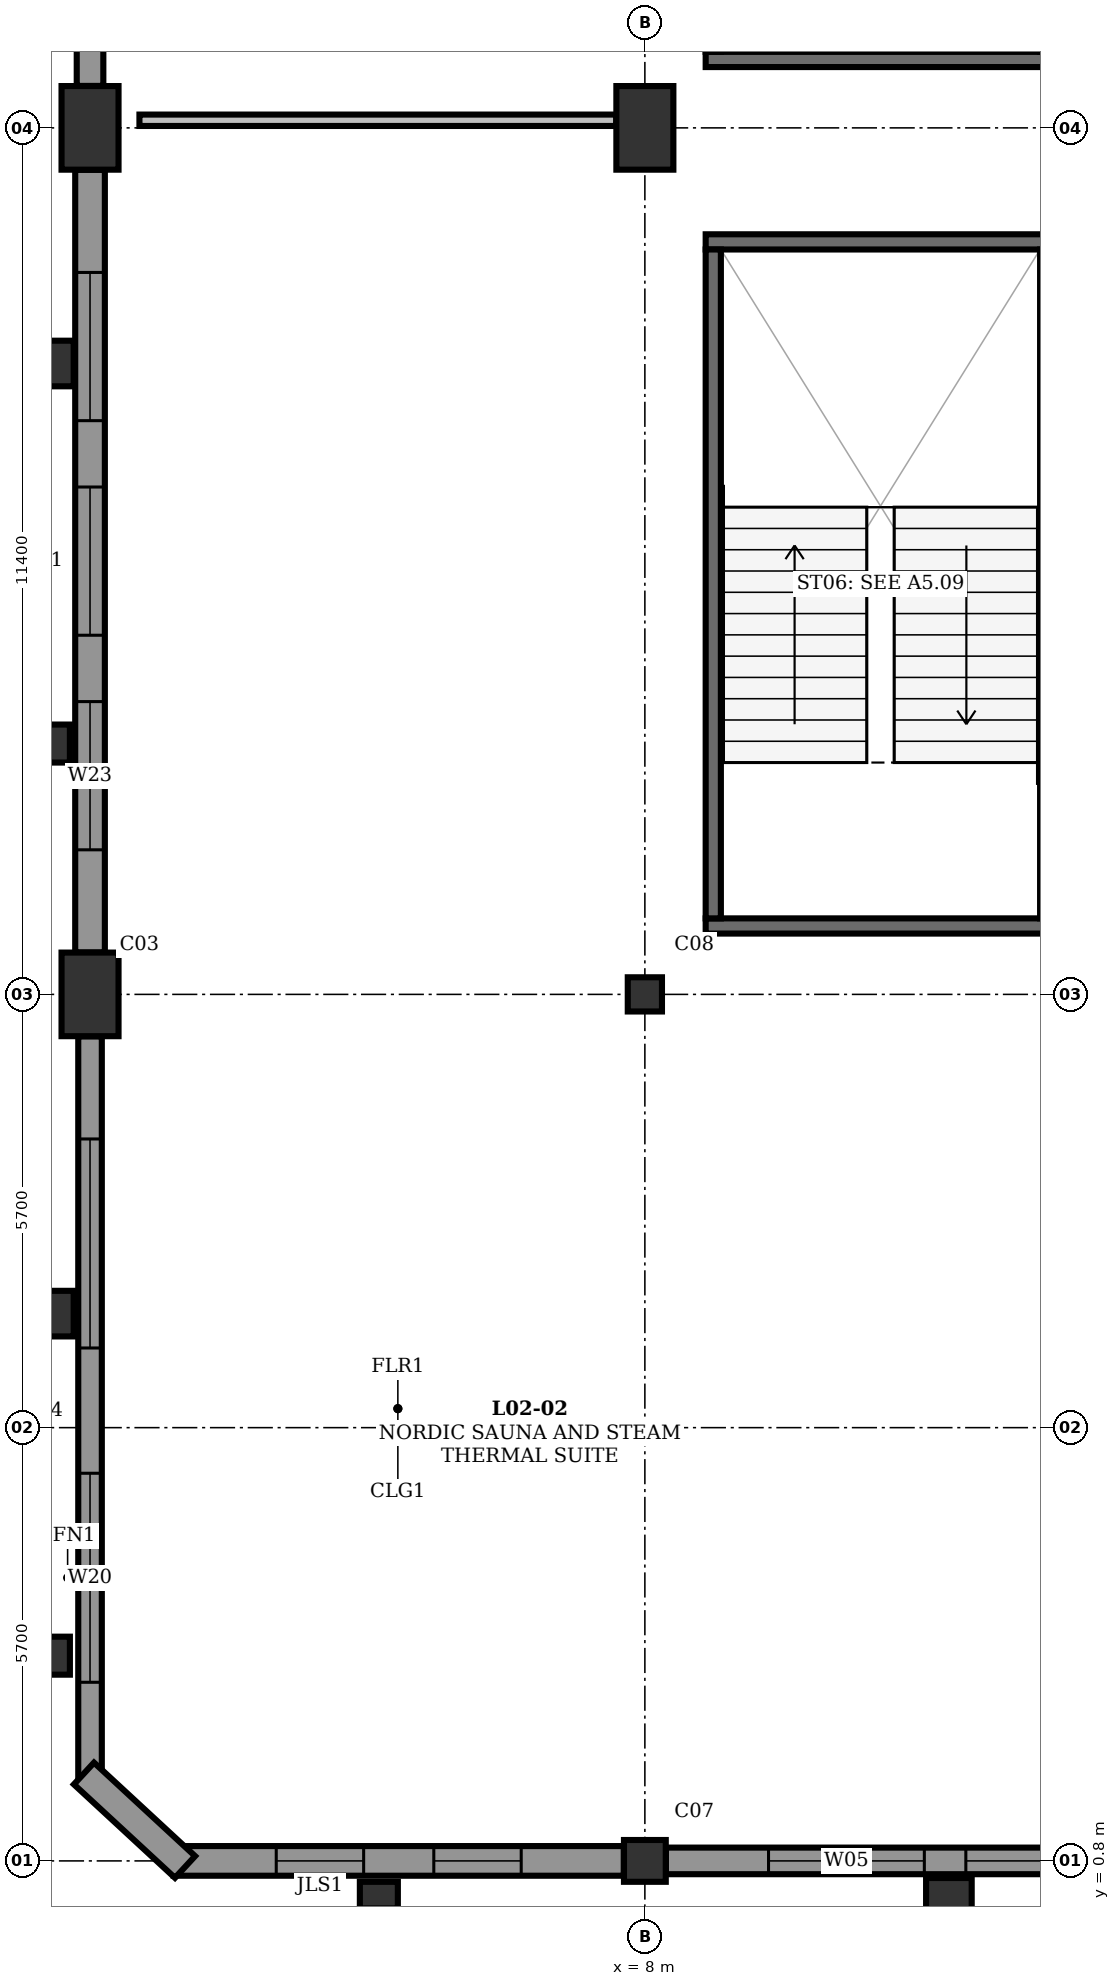
"""IFC4 building model, lengths in metres.
Left out: names, types, materials, properties, quantities, classifications, styles, units other than length and angle.
Written with IfcOpenShell. Run it as: python <this file> out.ifc"""

import sys

from ifc_helpers import new_model, si_unit, direction, frame, frame_2d, origin, origin_2d, place, context, subcontext, project, spatial, rectangle, extrude, element, fill, save


model = new_model("IFC4")
c1 = context("Model", 3, precision=1e-05, world=origin(), true_north=direction((0.0, 1.0)))
c2 = subcontext(c1, "Body", "Model", "MODEL_VIEW")
j1 = project(units=[si_unit("LENGTHUNIT", "METRE"), si_unit("PLANEANGLEUNIT", "RADIAN")], contexts=[c1])
p1 = place(None, origin())
s1 = spatial("IfcSite", under=j1, at=p1, CompositionType="ELEMENT")
p2 = place(p1, origin())
s2 = spatial("IfcBuilding", under=s1, at=p2, CompositionType="ELEMENT")
p3 = place(p2, frame((0.0, 0.0, 10.2)))
s3 = spatial("IfcBuildingStorey", under=s2, at=p3, CompositionType="ELEMENT", Elevation=10.2)
for number, where, z_axis, x_axis in (
    (1, (0.7, 12.2, 0.0), (0.0, 0.0, 1.0), (1.0, 0.0, 0.0)),
    (2, (0.7, 23.6, 0.0), (0.0, 0.0, 1.0), (1.0, 0.0, 0.0)),
):
    element("IfcColumn", number, at=place(p3, frame(where, z_axis=z_axis, x_axis=x_axis)), inside=s3, PredefinedType="COLUMN", context=c2, shape_type="SweptSolid", body=[
        extrude(rectangle(XDim=0.75, YDim=1.1, at=origin_2d()), origin(), (0.0, 0.0, 1.0), 4.5),
    ])
p4 = place(p3, frame((8.0, 0.8, 0.0), z_axis=(0.0, 0.0, 1.0), x_axis=(1.0, 0.0, 0.0)))
e3 = element("IfcColumn", 3, at=p4, inside=s3, PredefinedType="COLUMN", context=c2, shape_type="SweptSolid", body=[
    extrude(rectangle(XDim=0.55, YDim=0.55, at=origin_2d()), origin(), (0.0, 0.0, 1.0), 4.5),
])
p5 = place(p3, frame((8.0, 12.2, 0.0), z_axis=(0.0, 0.0, 1.0), x_axis=(1.0, 0.0, 0.0)))
e4 = element("IfcColumn", 4, at=p5, inside=s3, PredefinedType="COLUMN", context=c2, shape_type="SweptSolid", body=[
    extrude(rectangle(XDim=0.45, YDim=0.45, at=origin_2d()), origin(), (0.0, 0.0, 1.0), 4.5),
])
p6 = place(p3, frame((8.0, 23.6, 0.0), z_axis=(0.0, 0.0, 1.0), x_axis=(1.0, 0.0, 0.0)))
e5 = element("IfcColumn", 5, at=p6, inside=s3, PredefinedType="COLUMN", context=c2, shape_type="SweptSolid", body=[
    extrude(rectangle(XDim=0.75, YDim=1.1, at=origin_2d()), origin(), (0.0, 0.0, 1.0), 4.5),
])
p7 = place(p3, frame((0.26, 3.5, 0.0), z_axis=(0.0, 0.0, 1.0), x_axis=(1.0, 0.0, 0.0)))
e6 = element("IfcColumn", 6, at=p7, inside=s3, PredefinedType="PILASTER", context=c2, shape_type="SweptSolid", body=[
    extrude(rectangle(XDim=0.35, YDim=0.5, at=origin_2d()), origin(), (0.0, 0.0, 1.0), 4.5),
])
p8 = place(p3, frame((0.26, 8.0, 0.0), z_axis=(0.0, 0.0, 1.0), x_axis=(1.0, 0.0, 0.0)))
e7 = element("IfcColumn", 7, at=p8, inside=s3, PredefinedType="PILASTER", context=c2, shape_type="SweptSolid", body=[
    extrude(rectangle(XDim=0.45, YDim=0.6, at=origin_2d()), origin(), (0.0, 0.0, 1.0), 4.5),
])
p9 = place(p3, frame((0.26, 15.5, 0.0), z_axis=(0.0, 0.0, 1.0), x_axis=(1.0, 0.0, 0.0)))
e8 = element("IfcColumn", 8, at=p9, inside=s3, PredefinedType="PILASTER", context=c2, shape_type="SweptSolid", body=[
    extrude(rectangle(XDim=0.35, YDim=0.5, at=origin_2d()), origin(), (0.0, 0.0, 1.0), 4.5),
])
p10 = place(p3, frame((0.26, 20.5, 0.0), z_axis=(0.0, 0.0, 1.0), x_axis=(1.0, 0.0, 0.0)))
e9 = element("IfcColumn", 9, at=p10, inside=s3, PredefinedType="PILASTER", context=c2, shape_type="SweptSolid", body=[
    extrude(rectangle(XDim=0.45, YDim=0.6, at=origin_2d()), origin(), (0.0, 0.0, 1.0), 4.5),
])
p11 = place(p3, frame((4.5, 0.35, 0.0), z_axis=(0.0, 0.0, 1.0), x_axis=(0.0, 1.0, 0.0)))
e10 = element("IfcColumn", 10, at=p11, inside=s3, PredefinedType="PILASTER", context=c2, shape_type="SweptSolid", body=[
    extrude(rectangle(XDim=0.35, YDim=0.5, at=origin_2d()), origin(), (0.0, 0.0, 1.0), 4.5),
])
p12 = place(p3, frame((12.0, 0.35, 0.0), z_axis=(0.0, 0.0, 1.0), x_axis=(0.0, 1.0, 0.0)))
e11 = element("IfcColumn", 11, at=p12, inside=s3, PredefinedType="PILASTER", context=c2, shape_type="SweptSolid", body=[
    extrude(rectangle(XDim=0.45, YDim=0.6, at=origin_2d()), origin(), (0.0, 0.0, 1.0), 4.5),
])
p13 = place(p3, frame((0.7, 1.8, 0.0), z_axis=(0.0, 0.0, 1.0), x_axis=(0.0, 1.0, 0.0)))
e12 = element("IfcWall", 12, at=p13, inside=s3, PredefinedType="STANDARD", context=c2, shape_type="SweptSolid", body=[
    extrude(rectangle(XDim=9.848, YDim=0.31, at=frame_2d((4.924, 0.0))), origin(), (0.0, 0.0, 1.0), 4.2),
])
p14 = place(p13, frame((1.35, 0.0, 0.75)))
e13 = element("IfcOpeningElement", 13, at=p14, cuts=e12, PredefinedType="OPENING", context=c2, shape_type="SweptSolid", body=[
    extrude(rectangle(XDim=2.75, YDim=2.35, at=frame_2d((1.375, 1.175))), frame((0.0, 0.167, 0.0), z_axis=(0.0, -1.0, 0.0), x_axis=(1.0, 0.0, 0.0)), (0.0, 0.0, 1.0), 0.334),
])
p15 = place(p13, frame((5.748, 0.0, 0.75)))
e14 = element("IfcOpeningElement", 14, at=p15, cuts=e12, PredefinedType="OPENING", context=c2, shape_type="SweptSolid", body=[
    extrude(rectangle(XDim=2.75, YDim=2.35, at=frame_2d((1.375, 1.175))), frame((0.0, 0.167, 0.0), z_axis=(0.0, -1.0, 0.0), x_axis=(1.0, 0.0, 0.0)), (0.0, 0.0, 1.0), 0.334),
])
p16 = place(p3, frame((0.7, 12.752, 0.0), z_axis=(0.0, 0.0, 1.0), x_axis=(0.0, 1.0, 0.0)))
e15 = element("IfcWall", 15, at=p16, inside=s3, PredefinedType="STANDARD", context=c2, shape_type="SweptSolid", body=[
    extrude(rectangle(XDim=10.296, YDim=0.39, at=frame_2d((5.148, 0.0))), origin(), (0.0, 0.0, 1.0), 3.712),
])
p17 = place(p16, frame((1.35, 0.0, 0.75)))
e16 = element("IfcOpeningElement", 16, at=p17, cuts=e15, PredefinedType="OPENING", context=c2, shape_type="SweptSolid", body=[
    extrude(rectangle(XDim=1.95, YDim=1.55, at=frame_2d((0.975, 0.775))), frame((0.0, 0.207, 0.0), z_axis=(0.0, -1.0, 0.0), x_axis=(1.0, 0.0, 0.0)), (0.0, 0.0, 1.0), 0.414),
])
p18 = place(p16, frame((4.173, 0.0, 0.75)))
e17 = element("IfcOpeningElement", 17, at=p18, cuts=e15, PredefinedType="OPENING", context=c2, shape_type="SweptSolid", body=[
    extrude(rectangle(XDim=1.95, YDim=1.55, at=frame_2d((0.975, 0.775))), frame((0.0, 0.207, 0.0), z_axis=(0.0, -1.0, 0.0), x_axis=(1.0, 0.0, 0.0)), (0.0, 0.0, 1.0), 0.414),
])
p19 = place(p16, frame((6.996, 0.0, 0.75)))
e18 = element("IfcOpeningElement", 18, at=p19, cuts=e15, PredefinedType="OPENING", context=c2, shape_type="SweptSolid", body=[
    extrude(rectangle(XDim=1.95, YDim=1.55, at=frame_2d((0.975, 0.775))), frame((0.0, 0.207, 0.0), z_axis=(0.0, -1.0, 0.0), x_axis=(1.0, 0.0, 0.0)), (0.0, 0.0, 1.0), 0.414),
])
p20 = place(p3, frame((0.7, 24.152, 0.0), z_axis=(0.0, 0.0, 1.0), x_axis=(0.0, 1.0, 0.0)))
e19 = element("IfcWall", 19, at=p20, inside=s3, PredefinedType="STANDARD", context=c2, shape_type="SweptSolid", body=[
    extrude(rectangle(XDim=10.296, YDim=0.35, at=frame_2d((5.148, 0.0))), origin(), (0.0, 0.0, 1.0), 3.712),
])
p21 = place(p20, frame((1.35, 0.0, 0.75)))
e20 = element("IfcOpeningElement", 20, at=p21, cuts=e19, PredefinedType="OPENING", context=c2, shape_type="SweptSolid", body=[
    extrude(rectangle(XDim=2.45, YDim=2.5, at=frame_2d((1.225, 1.25))), frame((0.0, 0.187, 0.0), z_axis=(0.0, -1.0, 0.0), x_axis=(1.0, 0.0, 0.0)), (0.0, 0.0, 1.0), 0.374),
])
p22 = place(p20, frame((6.496, 0.0, 0.75)))
e21 = element("IfcOpeningElement", 21, at=p22, cuts=e19, PredefinedType="OPENING", context=c2, shape_type="SweptSolid", body=[
    extrude(rectangle(XDim=2.45, YDim=2.5, at=frame_2d((1.225, 1.25))), frame((0.0, 0.187, 0.0), z_axis=(0.0, -1.0, 0.0), x_axis=(1.0, 0.0, 0.0)), (0.0, 0.0, 1.0), 0.374),
])
p23 = place(p3, frame((1.8, 0.8, 0.0), z_axis=(0.0, 0.0, 1.0), x_axis=(1.0, 0.0, 0.0)))
e22 = element("IfcWall", 22, at=p23, inside=s3, PredefinedType="STANDARD", context=c2, shape_type="SweptSolid", body=[
    extrude(rectangle(XDim=5.923, YDim=0.39, at=frame_2d((2.961, 0.0))), origin(), (0.0, 0.0, 1.0), 3.545),
])
p24 = place(p23, frame((1.35, 0.0, 0.75)))
e23 = element("IfcOpeningElement", 23, at=p24, cuts=e22, PredefinedType="OPENING", context=c2, shape_type="SweptSolid", body=[
    extrude(rectangle(XDim=1.15, YDim=1.75, at=frame_2d((0.575, 0.875))), frame((0.0, 0.207, 0.0), z_axis=(0.0, -1.0, 0.0), x_axis=(1.0, 0.0, 0.0)), (0.0, 0.0, 1.0), 0.414),
])
p25 = place(p23, frame((3.423, 0.0, 0.75)))
e24 = element("IfcOpeningElement", 24, at=p25, cuts=e22, PredefinedType="OPENING", context=c2, shape_type="SweptSolid", body=[
    extrude(rectangle(XDim=1.15, YDim=1.75, at=frame_2d((0.575, 0.875))), frame((0.0, 0.207, 0.0), z_axis=(0.0, -1.0, 0.0), x_axis=(1.0, 0.0, 0.0)), (0.0, 0.0, 1.0), 0.414),
])
p26 = place(p3, frame((8.277, 0.8, 0.0), z_axis=(0.0, 0.0, 1.0), x_axis=(1.0, 0.0, 0.0)))
e25 = element("IfcWall", 25, at=p26, inside=s3, PredefinedType="STANDARD", context=c2, shape_type="SweptSolid", body=[
    extrude(rectangle(XDim=7.346, YDim=0.35, at=frame_2d((3.673, 0.0))), origin(), (0.0, 0.0, 1.0), 3.545),
])
p27 = place(p26, frame((1.35, 0.0, 0.75)))
e26 = element("IfcOpeningElement", 26, at=p27, cuts=e25, PredefinedType="OPENING", context=c2, shape_type="SweptSolid", body=[
    extrude(rectangle(XDim=2.05, YDim=1.75, at=frame_2d((1.025, 0.875))), frame((0.0, 0.187, 0.0), z_axis=(0.0, -1.0, 0.0), x_axis=(1.0, 0.0, 0.0)), (0.0, 0.0, 1.0), 0.374),
])
p28 = place(p26, frame((3.946, 0.0, 0.75)))
e27 = element("IfcOpeningElement", 27, at=p28, cuts=e25, PredefinedType="OPENING", context=c2, shape_type="SweptSolid", body=[
    extrude(rectangle(XDim=2.05, YDim=1.75, at=frame_2d((1.025, 0.875))), frame((0.0, 0.187, 0.0), z_axis=(0.0, -1.0, 0.0), x_axis=(1.0, 0.0, 0.0)), (0.0, 0.0, 1.0), 0.374),
])
p29 = place(p3, frame((0.62, 1.95, 0.0), z_axis=(0.0, 0.0, 1.0), x_axis=(0.734131351327, -0.679007480812, 0.0)))
e28 = element("IfcWall", 28, at=p29, inside=s3, PredefinedType="STANDARD", context=c2, shape_type="SweptSolid", body=[
    extrude(rectangle(XDim=1.812, YDim=0.39, at=frame_2d((0.906, 0.0))), origin(), (0.0, 0.0, 1.0), 4.2),
])
for number, where, z_axis, x_axis in (
    (29, (8.8, 13.1, 0.0), (0.0, 0.0, 1.0), (1.0, 0.0, 0.0)),
    (30, (8.8, 22.1, 0.0), (0.0, 0.0, 1.0), (1.0, 0.0, 0.0)),
):
    element("IfcWall", number, at=place(p3, frame(where, z_axis=z_axis, x_axis=x_axis)), inside=s3, PredefinedType="SOLIDWALL", context=c2, shape_type="SweptSolid", body=[
        extrude(rectangle(XDim=4.6, YDim=0.2, at=frame_2d((2.3, 0.0))), origin(), (0.0, 0.0, 1.0), 4.26),
    ])
p30 = place(p3, frame((8.9, 13.2, 0.0), z_axis=(0.0, 0.0, 1.0), x_axis=(0.0, 1.0, 0.0)))
e31 = element("IfcWall", 31, at=p30, inside=s3, PredefinedType="SOLIDWALL", context=c2, shape_type="SweptSolid", body=[
    extrude(rectangle(XDim=8.8, YDim=0.2, at=frame_2d((4.4, 0.0))), origin(), (0.0, 0.0, 1.0), 4.26),
])
p31 = place(p3, frame((8.8, 24.5, 0.0), z_axis=(0.0, 0.0, 1.0), x_axis=(1.0, 0.0, 0.0)))
e32 = element("IfcWall", 32, at=p31, inside=s3, PredefinedType="SOLIDWALL", context=c2, shape_type="SweptSolid", body=[
    extrude(rectangle(XDim=4.6, YDim=0.2, at=frame_2d((2.3, 0.0))), origin(), (0.0, 0.0, 1.0), 4.26),
])
p32 = place(p3, frame((1.35, 23.7, 0.0), z_axis=(0.0, 0.0, 1.0), x_axis=(1.0, 0.0, 0.0)))
e33 = element("IfcWall", 33, at=p32, inside=s3, PredefinedType="PARTITIONING", context=c2, shape_type="SweptSolid", body=[
    extrude(rectangle(XDim=6.273, YDim=0.15, at=frame_2d((3.136, 0.0))), origin(), (0.0, 0.0, 1.0), 3.345),
])
p33 = place(p14, origin())
e34 = element("IfcWindow", 34, at=p33, inside=s3, PartitioningType="TRIPLE_PANEL_VERTICAL", PredefinedType="WINDOW", context=c2, shape_type="SweptSolid", body=[
    extrude(rectangle(XDim=2.75, YDim=2.35, at=frame_2d((1.375, 1.175))), frame((0.0, 0.08, 0.0), z_axis=(0.0, -1.0, 0.0), x_axis=(1.0, 0.0, 0.0)), (0.0, 0.0, 1.0), 0.06),
])
fill(e13, e34)
p34 = place(p15, origin())
e35 = element("IfcWindow", 35, at=p34, inside=s3, PartitioningType="TRIPLE_PANEL_VERTICAL", PredefinedType="WINDOW", context=c2, shape_type="SweptSolid", body=[
    extrude(rectangle(XDim=2.75, YDim=2.35, at=frame_2d((1.375, 1.175))), frame((0.0, 0.08, 0.0), z_axis=(0.0, -1.0, 0.0), x_axis=(1.0, 0.0, 0.0)), (0.0, 0.0, 1.0), 0.06),
])
fill(e14, e35)
p35 = place(p17, origin())
e36 = element("IfcWindow", 36, at=p35, inside=s3, PartitioningType="DOUBLE_PANEL_VERTICAL", PredefinedType="WINDOW", context=c2, shape_type="SweptSolid", body=[
    extrude(rectangle(XDim=1.95, YDim=1.55, at=frame_2d((0.975, 0.775))), frame((0.0, 0.08, 0.0), z_axis=(0.0, -1.0, 0.0), x_axis=(1.0, 0.0, 0.0)), (0.0, 0.0, 1.0), 0.06),
])
fill(e16, e36)
p36 = place(p18, origin())
e37 = element("IfcWindow", 37, at=p36, inside=s3, PartitioningType="DOUBLE_PANEL_VERTICAL", PredefinedType="WINDOW", context=c2, shape_type="SweptSolid", body=[
    extrude(rectangle(XDim=1.95, YDim=1.55, at=frame_2d((0.975, 0.775))), frame((0.0, 0.08, 0.0), z_axis=(0.0, -1.0, 0.0), x_axis=(1.0, 0.0, 0.0)), (0.0, 0.0, 1.0), 0.06),
])
fill(e17, e37)
p37 = place(p19, origin())
e38 = element("IfcWindow", 38, at=p37, inside=s3, PartitioningType="DOUBLE_PANEL_VERTICAL", PredefinedType="WINDOW", context=c2, shape_type="SweptSolid", body=[
    extrude(rectangle(XDim=1.95, YDim=1.55, at=frame_2d((0.975, 0.775))), frame((0.0, 0.08, 0.0), z_axis=(0.0, -1.0, 0.0), x_axis=(1.0, 0.0, 0.0)), (0.0, 0.0, 1.0), 0.06),
])
fill(e18, e38)
p38 = place(p24, origin())
e39 = element("IfcWindow", 39, at=p38, inside=s3, PartitioningType="SINGLE_PANEL", PredefinedType="WINDOW", context=c2, shape_type="SweptSolid", body=[
    extrude(rectangle(XDim=1.15, YDim=1.75, at=frame_2d((0.575, 0.875))), frame((0.0, 0.08, 0.0), z_axis=(0.0, -1.0, 0.0), x_axis=(1.0, 0.0, 0.0)), (0.0, 0.0, 1.0), 0.06),
])
fill(e23, e39)
p39 = place(p25, origin())
e40 = element("IfcWindow", 40, at=p39, inside=s3, PartitioningType="SINGLE_PANEL", PredefinedType="WINDOW", context=c2, shape_type="SweptSolid", body=[
    extrude(rectangle(XDim=1.15, YDim=1.75, at=frame_2d((0.575, 0.875))), frame((0.0, 0.08, 0.0), z_axis=(0.0, -1.0, 0.0), x_axis=(1.0, 0.0, 0.0)), (0.0, 0.0, 1.0), 0.06),
])
fill(e24, e40)
p40 = place(p27, origin())
e41 = element("IfcWindow", 41, at=p40, inside=s3, PartitioningType="TRIPLE_PANEL_VERTICAL", PredefinedType="WINDOW", context=c2, shape_type="SweptSolid", body=[
    extrude(rectangle(XDim=2.05, YDim=1.75, at=frame_2d((1.025, 0.875))), frame((0.0, 0.08, 0.0), z_axis=(0.0, -1.0, 0.0), x_axis=(1.0, 0.0, 0.0)), (0.0, 0.0, 1.0), 0.06),
])
fill(e26, e41)
p41 = place(p28, origin())
e42 = element("IfcWindow", 42, at=p41, inside=s3, PartitioningType="TRIPLE_PANEL_VERTICAL", PredefinedType="WINDOW", context=c2, shape_type="SweptSolid", body=[
    extrude(rectangle(XDim=2.05, YDim=1.75, at=frame_2d((1.025, 0.875))), frame((0.0, 0.08, 0.0), z_axis=(0.0, -1.0, 0.0), x_axis=(1.0, 0.0, 0.0)), (0.0, 0.0, 1.0), 0.06),
])
fill(e27, e42)
save(model, sys.argv[1])
